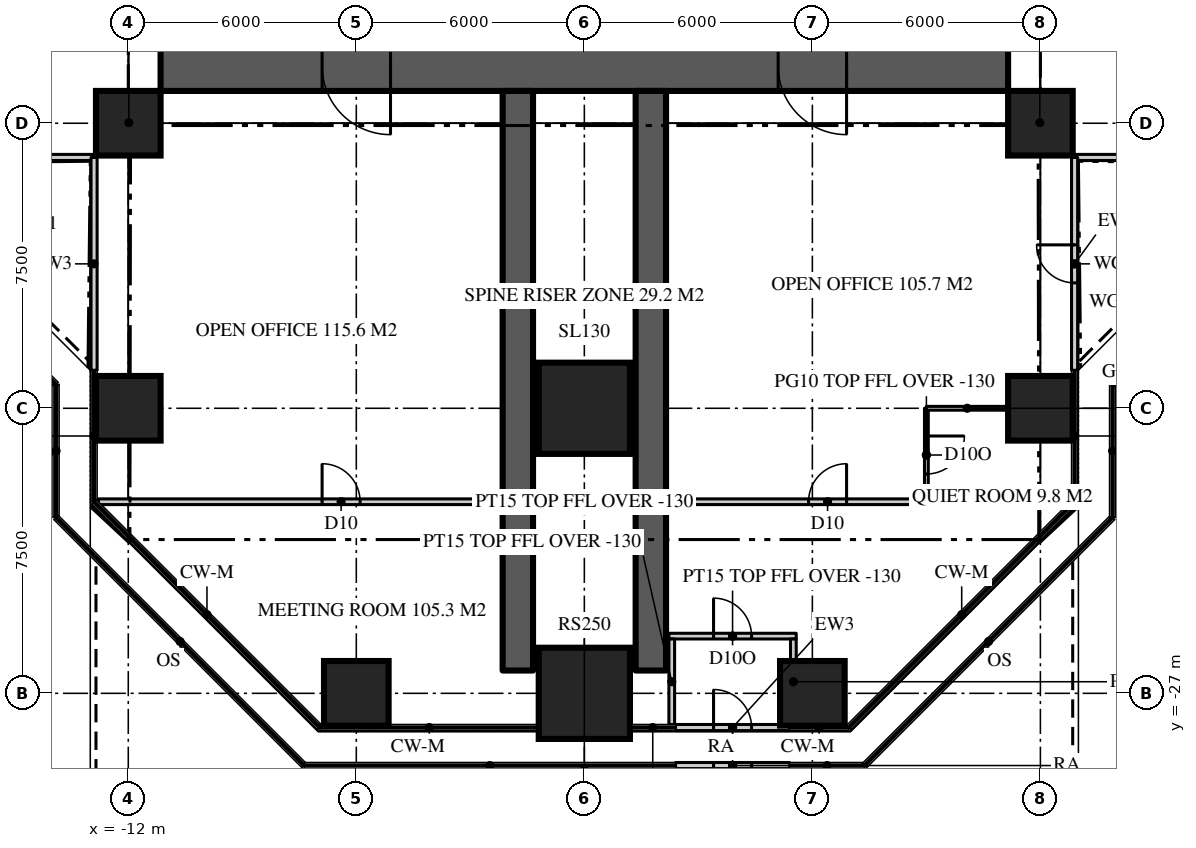
"""IFC4 building model, lengths in metres.
Left out: names, types, materials, properties, quantities, classifications, styles, units other than length and angle.
Written with IfcOpenShell. Run it as: python <this file> out.ifc"""

import sys

from ifc_helpers import new_model, si_unit, direction, frame, frame_2d, origin, origin_2d, place, context, subcontext, project, spatial, rectangle, extrude, element, fill, save


model = new_model("IFC4")
c1 = context("Model", 3, precision=1e-05, world=origin(), true_north=direction((0.0, 1.0)))
c2 = subcontext(c1, "Body", "Model", "MODEL_VIEW")
j1 = project(units=[si_unit("LENGTHUNIT", "METRE"), si_unit("PLANEANGLEUNIT", "RADIAN")], contexts=[c1])
p1 = place(None, origin())
s1 = spatial("IfcSite", under=j1, at=p1, CompositionType="ELEMENT")
p2 = place(p1, origin())
s2 = spatial("IfcBuilding", under=s1, at=p2, CompositionType="ELEMENT")
p3 = place(p2, frame((0.0, 0.0, 124.2)))
s3 = spatial("IfcBuildingStorey", under=s2, at=p3, CompositionType="ELEMENT", Elevation=124.2)
p4 = place(p3, frame((11.15, -10.5, 0.0), z_axis=(0.0, 0.0, 1.0), x_axis=(-1.0, 0.0, 0.0)))
e1 = element("IfcWall", 1, at=p4, inside=s3, PredefinedType="SHEAR", context=c2, shape_type="SweptSolid", body=[
    extrude(rectangle(XDim=22.3, YDim=1.3, at=frame_2d((11.15, 0.0))), origin(), (0.0, 0.0, 1.0), 3.9),
])
p5 = place(p4, frame((16.25, 0.0, 0.0)))
e2 = element("IfcOpeningElement", 2, at=p5, cuts=e1, PredefinedType="OPENING", context=c2, shape_type="SweptSolid", body=[
    extrude(rectangle(XDim=1.8, YDim=2.2, at=frame_2d((0.9, 1.1))), frame((0.0, 0.66, 0.0), z_axis=(0.0, -1.0, 0.0), x_axis=(1.0, 0.0, 0.0)), (0.0, 0.0, 1.0), 1.32),
])
p6 = place(p4, frame((4.25, 0.0, 0.0)))
e3 = element("IfcOpeningElement", 3, at=p6, cuts=e1, PredefinedType="OPENING", context=c2, shape_type="SweptSolid", body=[
    extrude(rectangle(XDim=1.8, YDim=2.2, at=frame_2d((0.9, 1.1))), frame((0.0, 0.66, 0.0), z_axis=(0.0, -1.0, 0.0), x_axis=(1.0, 0.0, 0.0)), (0.0, 0.0, 1.0), 1.32),
])
for number, where, z_axis, x_axis in (
    (4, (-1.75, -11.15, 0.0), (0.0, 0.0, 1.0), (0.0, -1.0, 0.0)),
    (5, (1.75, -11.15, 0.0), (0.0, 0.0, 1.0), (0.0, -1.0, 0.0)),
):
    element("IfcWall", number, at=place(p3, frame(where, z_axis=z_axis, x_axis=x_axis)), inside=s3, PredefinedType="SHEAR", context=c2, shape_type="SweptSolid", body=[
        extrude(rectangle(XDim=15.25, YDim=0.8, at=frame_2d((7.625, 0.0))), origin(), (0.0, 0.0, 1.0), 3.9),
    ])
p7 = place(p3, frame((-6.0, -27.0, -0.13), z_axis=(0.0, 0.0, 1.0), x_axis=(1.0, 0.0, 0.0)))
e6 = element("IfcColumn", 6, at=p7, inside=s3, PredefinedType="COLUMN", context=c2, shape_type="SweptSolid", body=[
    extrude(rectangle(XDim=1.7, YDim=1.7, at=origin_2d()), origin(), (0.0, 0.0, 1.0), 4.03),
])
p8 = place(p3, frame((0.0, -27.0, 0.0), z_axis=(0.0, 0.0, 1.0), x_axis=(1.0, 0.0, 0.0)))
e7 = element("IfcColumn", 7, at=p8, inside=s3, PredefinedType="COLUMN", context=c2, shape_type="SweptSolid", body=[
    extrude(rectangle(XDim=2.4, YDim=2.4, at=origin_2d()), origin(), (0.0, 0.0, 1.0), 3.9),
])
p9 = place(p3, frame((6.0, -27.0, -0.13), z_axis=(0.0, 0.0, 1.0), x_axis=(1.0, 0.0, 0.0)))
e8 = element("IfcColumn", 8, at=p9, inside=s3, PredefinedType="COLUMN", context=c2, shape_type="SweptSolid", body=[
    extrude(rectangle(XDim=1.7, YDim=1.7, at=origin_2d()), origin(), (0.0, 0.0, 1.0), 4.03),
])
p10 = place(p3, frame((-12.0, -19.5, 0.0), z_axis=(0.0, 0.0, 1.0), x_axis=(1.0, 0.0, 0.0)))
e9 = element("IfcColumn", 9, at=p10, inside=s3, PredefinedType="COLUMN", context=c2, shape_type="SweptSolid", body=[
    extrude(rectangle(XDim=1.7, YDim=1.7, at=origin_2d()), origin(), (0.0, 0.0, 1.0), 3.9),
])
p11 = place(p3, frame((0.0, -19.5, 0.0), z_axis=(0.0, 0.0, 1.0), x_axis=(1.0, 0.0, 0.0)))
e10 = element("IfcColumn", 10, at=p11, inside=s3, PredefinedType="COLUMN", context=c2, shape_type="SweptSolid", body=[
    extrude(rectangle(XDim=2.4, YDim=2.4, at=origin_2d()), origin(), (0.0, 0.0, 1.0), 3.9),
])
for number, where, z_axis, x_axis in (
    (11, (12.0, -19.5, 0.0), (0.0, 0.0, 1.0), (1.0, 0.0, 0.0)),
    (12, (-12.0, -12.0, 0.0), (0.0, 0.0, 1.0), (1.0, 0.0, 0.0)),
    (13, (12.0, -12.0, 0.0), (0.0, 0.0, 1.0), (1.0, 0.0, 0.0)),
):
    element("IfcColumn", number, at=place(p3, frame(where, z_axis=z_axis, x_axis=x_axis)), inside=s3, PredefinedType="COLUMN", context=c2, shape_type="SweptSolid", body=[
        extrude(rectangle(XDim=1.7, YDim=1.7, at=origin_2d()), origin(), (0.0, 0.0, 1.0), 3.9),
    ])
p12 = place(p3, frame((12.9, -12.9, 0.0), z_axis=(0.0, 0.0, 1.0), x_axis=(1.0, 0.0, 0.0)))
e14 = element("IfcWall", 14, at=p12, inside=s3, PredefinedType="SOLIDWALL", context=c2, shape_type="SweptSolid", body=[
    extrude(rectangle(XDim=5.6, YDim=0.16, at=frame_2d((2.8, 0.0))), origin(), (0.0, 0.0, 1.0), 3.77),
])
p13 = place(p3, frame((-18.5, -12.9, 0.0), z_axis=(0.0, 0.0, 1.0), x_axis=(1.0, 0.0, 0.0)))
e15 = element("IfcWall", 15, at=p13, inside=s3, PredefinedType="SOLIDWALL", context=c2, shape_type="SweptSolid", body=[
    extrude(rectangle(XDim=5.6, YDim=0.16, at=frame_2d((2.8, 0.0))), origin(), (0.0, 0.0, 1.0), 3.77),
])
p14 = place(p13, frame((2.3, 0.0, 0.0)))
e16 = element("IfcOpeningElement", 16, at=p14, cuts=e15, PredefinedType="OPENING", context=c2, shape_type="SweptSolid", body=[
    extrude(rectangle(XDim=1.0, YDim=2.2, at=frame_2d((0.5, 1.1))), frame((0.0, 0.09, 0.0), z_axis=(0.0, -1.0, 0.0), x_axis=(1.0, 0.0, 0.0)), (0.0, 0.0, 1.0), 0.18),
])
p15 = place(p3, frame((-12.9, -12.9, 0.0), z_axis=(0.0, 0.0, 1.0), x_axis=(0.0, -1.0, 0.0)))
e17 = element("IfcWall", 17, at=p15, inside=s3, PredefinedType="SOLIDWALL", context=c2, shape_type="SweptSolid", body=[
    extrude(rectangle(XDim=5.6, YDim=0.16, at=frame_2d((2.8, 0.0))), origin(), (0.0, 0.0, 1.0), 3.77),
])
p16 = place(p3, frame((2.4, -27.9, 0.0), z_axis=(0.0, 0.0, 1.0), x_axis=(1.0, 0.0, 0.0)))
e18 = element("IfcWall", 18, at=p16, inside=s3, PredefinedType="SOLIDWALL", context=c2, shape_type="SweptSolid", body=[
    extrude(rectangle(XDim=3.0, YDim=0.16, at=frame_2d((1.5, 0.0))), origin(), (0.0, 0.0, 1.0), 3.77),
])
p17 = place(p16, frame((1.0, 0.0, 0.0)))
e19 = element("IfcOpeningElement", 19, at=p17, cuts=e18, PredefinedType="OPENING", context=c2, shape_type="SweptSolid", body=[
    extrude(rectangle(XDim=1.0, YDim=2.2, at=frame_2d((0.5, 1.1))), frame((0.0, 0.09, 0.0), z_axis=(0.0, -1.0, 0.0), x_axis=(1.0, 0.0, 0.0)), (0.0, 0.0, 1.0), 0.18),
])
p18 = place(p3, frame((12.9, -18.5, 0.0), z_axis=(0.0, 0.0, 1.0), x_axis=(0.0, 1.0, 0.0)))
e20 = element("IfcWall", 20, at=p18, inside=s3, PredefinedType="SOLIDWALL", context=c2, shape_type="SweptSolid", body=[
    extrude(rectangle(XDim=5.6, YDim=0.16, at=frame_2d((2.8, 0.0))), origin(), (0.0, 0.0, 1.0), 3.77),
])
p19 = place(p18, frame((2.3, 0.0, 0.0)))
e21 = element("IfcOpeningElement", 21, at=p19, cuts=e20, PredefinedType="OPENING", context=c2, shape_type="SweptSolid", body=[
    extrude(rectangle(XDim=1.0, YDim=2.2, at=frame_2d((0.5, 1.1))), frame((0.0, 0.09, 0.0), z_axis=(0.0, -1.0, 0.0), x_axis=(1.0, 0.0, 0.0)), (0.0, 0.0, 1.0), 0.18),
])
p20 = place(p3, frame((5.4, -28.9, 0.0), z_axis=(0.0, 0.0, 1.0), x_axis=(-1.0, 0.0, 0.0)))
e22 = element("IfcWall", 22, at=p20, inside=s3, PredefinedType="SOLIDWALL", context=c2, shape_type="SweptSolid", body=[
    extrude(rectangle(XDim=3.0, YDim=0.16, at=frame_2d((1.5, 0.0))), origin(), (0.0, 0.0, 1.0), 3.9),
])
p21 = place(p20, frame((1.0, 0.0, 0.0)))
e23 = element("IfcOpeningElement", 23, at=p21, cuts=e22, PredefinedType="OPENING", context=c2, shape_type="SweptSolid", body=[
    extrude(rectangle(XDim=1.0, YDim=2.2, at=frame_2d((0.5, 1.1))), frame((0.0, 0.09, 0.0), z_axis=(0.0, -1.0, 0.0), x_axis=(1.0, 0.0, 0.0)), (0.0, 0.0, 1.0), 0.18),
])
p22 = place(p3, frame((-12.786, -21.959, 0.0), z_axis=(0.0, 0.0, 1.0), x_axis=(1.0, 0.0, 0.0)))
e24 = element("IfcWall", 24, at=p22, inside=s3, PredefinedType="PARTITIONING", context=c2, shape_type="SweptSolid", body=[
    extrude(rectangle(XDim=25.573, YDim=0.15, at=frame_2d((12.786, 0.0))), origin(), (0.0, 0.0, 1.0), 3.77),
])
p23 = place(p22, frame((18.687, 0.0, 0.0)))
e25 = element("IfcOpeningElement", 25, at=p23, cuts=e24, PredefinedType="OPENING", context=c2, shape_type="SweptSolid", body=[
    extrude(rectangle(XDim=1.0, YDim=2.2, at=frame_2d((0.5, 1.1))), frame((0.0, 0.085, 0.0), z_axis=(0.0, -1.0, 0.0), x_axis=(1.0, 0.0, 0.0)), (0.0, 0.0, 1.0), 0.17),
])
p24 = place(p22, frame((5.886, 0.0, 0.0)))
e26 = element("IfcOpeningElement", 26, at=p24, cuts=e24, PredefinedType="OPENING", context=c2, shape_type="SweptSolid", body=[
    extrude(rectangle(XDim=1.0, YDim=2.2, at=frame_2d((0.5, 1.1))), frame((0.0, 0.085, 0.0), z_axis=(0.0, -1.0, 0.0), x_axis=(1.0, 0.0, 0.0)), (0.0, 0.0, 1.0), 0.17),
])
p25 = place(p3, frame((9.0, -19.5, 0.0), z_axis=(0.0, 0.0, 1.0), x_axis=(0.0, -1.0, 0.0)))
e27 = element("IfcWall", 27, at=p25, inside=s3, PredefinedType="PARTITIONING", context=c2, shape_type="SweptSolid", body=[
    extrude(rectangle(XDim=2.459, YDim=0.1, at=frame_2d((1.229, 0.0))), origin(), (0.0, 0.0, 1.0), 3.77),
])
p26 = place(p25, frame((0.729, 0.0, 0.0)))
e28 = element("IfcOpeningElement", 28, at=p26, cuts=e27, PredefinedType="OPENING", context=c2, shape_type="SweptSolid", body=[
    extrude(rectangle(XDim=1.0, YDim=2.2, at=frame_2d((0.5, 1.1))), frame((0.0, 0.06, 0.0), z_axis=(0.0, -1.0, 0.0), x_axis=(1.0, 0.0, 0.0)), (0.0, 0.0, 1.0), 0.12),
])
p27 = place(p3, frame((9.0, -19.5, 0.0), z_axis=(0.0, 0.0, 1.0), x_axis=(1.0, 0.0, 0.0)))
e29 = element("IfcWall", 29, at=p27, inside=s3, PredefinedType="PARTITIONING", context=c2, shape_type="SweptSolid", body=[
    extrude(rectangle(XDim=2.15, YDim=0.1, at=frame_2d((1.075, 0.0))), origin(), (0.0, 0.0, 1.0), 2.77),
])
p28 = place(p3, frame((2.225, -25.495, 0.0), z_axis=(0.0, 0.0, 1.0), x_axis=(1.0, 0.0, 0.0)))
e30 = element("IfcWall", 30, at=p28, inside=s3, PredefinedType="PARTITIONING", context=c2, shape_type="SweptSolid", body=[
    extrude(rectangle(XDim=3.35, YDim=0.15, at=frame_2d((1.675, 0.0))), origin(), (0.0, 0.0, 1.0), 3.77),
])
p29 = place(p28, frame((1.175, 0.0, 0.0)))
e31 = element("IfcOpeningElement", 31, at=p29, cuts=e30, PredefinedType="OPENING", context=c2, shape_type="SweptSolid", body=[
    extrude(rectangle(XDim=1.0, YDim=2.2, at=frame_2d((0.5, 1.1))), frame((0.0, 0.085, 0.0), z_axis=(0.0, -1.0, 0.0), x_axis=(1.0, 0.0, 0.0)), (0.0, 0.0, 1.0), 0.17),
])
for number, where, z_axis, x_axis in (
    (32, (2.3, -25.57, 0.0), (0.0, 0.0, 1.0), (0.0, -1.0, 0.0)),
    (33, (5.5, -25.57, 0.0), (0.0, 0.0, 1.0), (0.0, -1.0, 0.0)),
):
    element("IfcWall", number, at=place(p3, frame(where, z_axis=z_axis, x_axis=x_axis)), inside=s3, PredefinedType="PARTITIONING", context=c2, shape_type="SweptSolid", body=[
        extrude(rectangle(XDim=2.25, YDim=0.15, at=frame_2d((1.125, 0.0))), origin(), (0.0, 0.0, 1.0), 3.77),
    ])
for number, where, z_axis, x_axis in (
    (34, (-11.15, -11.15, 0.0), (0.0, 0.0, 1.0), (-0.707, -0.707, 0.0)),
    (35, (11.15, -11.15, 0.0), (0.0, 0.0, 1.0), (0.707, -0.707, 0.0)),
):
    element("IfcWall", number, at=place(p3, frame(where, z_axis=z_axis, x_axis=x_axis)), inside=s3, PredefinedType="PARTITIONING", context=c2, shape_type="SweptSolid", body=[
        extrude(rectangle(XDim=2.362, YDim=0.15, at=frame_2d((1.181, 0.0))), origin(), (0.0, 0.0, 1.0), 3.22),
    ])
p30 = place(p17, origin())
e36 = element("IfcDoor", 36, at=p30, inside=s3, OperationType="SINGLE_SWING_LEFT", PredefinedType="DOOR", context=c2, shape_type="SweptSolid", body=[
    extrude(rectangle(XDim=1.0, YDim=2.2, at=frame_2d((0.5, 1.1))), frame((0.0, 0.025, 0.0), z_axis=(0.0, -1.0, 0.0), x_axis=(1.0, 0.0, 0.0)), (0.0, 0.0, 1.0), 0.05),
])
fill(e19, e36)
p31 = place(p19, origin())
e37 = element("IfcDoor", 37, at=p31, inside=s3, OperationType="SINGLE_SWING_RIGHT", PredefinedType="DOOR", context=c2, shape_type="SweptSolid", body=[
    extrude(rectangle(XDim=1.0, YDim=2.2, at=frame_2d((0.5, 1.1))), frame((0.0, 0.025, 0.0), z_axis=(0.0, -1.0, 0.0), x_axis=(1.0, 0.0, 0.0)), (0.0, 0.0, 1.0), 0.05),
])
fill(e21, e37)
p32 = place(p21, origin())
e38 = element("IfcDoor", 38, at=p32, inside=s3, OperationType="SINGLE_SWING_RIGHT", PredefinedType="DOOR", context=c2, shape_type="SweptSolid", body=[
    extrude(rectangle(XDim=1.0, YDim=2.2, at=frame_2d((0.5, 1.1))), frame((0.0, 0.025, 0.0), z_axis=(0.0, -1.0, 0.0), x_axis=(1.0, 0.0, 0.0)), (0.0, 0.0, 1.0), 0.05),
])
fill(e23, e38)
p33 = place(p5, origin())
e39 = element("IfcDoor", 39, at=p33, inside=s3, OperationType="DOUBLE_DOOR_DOUBLE_SWING", PredefinedType="DOOR", context=c2, shape_type="SweptSolid", body=[
    extrude(rectangle(XDim=1.8, YDim=2.2, at=frame_2d((0.9, 1.1))), frame((0.0, 0.025, 0.0), z_axis=(0.0, -1.0, 0.0), x_axis=(1.0, 0.0, 0.0)), (0.0, 0.0, 1.0), 0.05),
])
fill(e2, e39)
p34 = place(p6, origin())
e40 = element("IfcDoor", 40, at=p34, inside=s3, OperationType="DOUBLE_DOOR_DOUBLE_SWING", PredefinedType="DOOR", context=c2, shape_type="SweptSolid", body=[
    extrude(rectangle(XDim=1.8, YDim=2.2, at=frame_2d((0.9, 1.1))), frame((0.0, 0.025, 0.0), z_axis=(0.0, -1.0, 0.0), x_axis=(1.0, 0.0, 0.0)), (0.0, 0.0, 1.0), 0.05),
])
fill(e3, e40)
p35 = place(p23, origin())
e41 = element("IfcDoor", 41, at=p35, inside=s3, OperationType="SINGLE_SWING_RIGHT", PredefinedType="DOOR", context=c2, shape_type="SweptSolid", body=[
    extrude(rectangle(XDim=1.0, YDim=2.2, at=frame_2d((0.5, 1.1))), frame((0.0, 0.025, 0.0), z_axis=(0.0, -1.0, 0.0), x_axis=(1.0, 0.0, 0.0)), (0.0, 0.0, 1.0), 0.05),
])
fill(e25, e41)
p36 = place(p24, origin())
e42 = element("IfcDoor", 42, at=p36, inside=s3, OperationType="SINGLE_SWING_LEFT", PredefinedType="DOOR", context=c2, shape_type="SweptSolid", body=[
    extrude(rectangle(XDim=1.0, YDim=2.2, at=frame_2d((0.5, 1.1))), frame((0.0, 0.025, 0.0), z_axis=(0.0, -1.0, 0.0), x_axis=(1.0, 0.0, 0.0)), (0.0, 0.0, 1.0), 0.05),
])
fill(e26, e42)
p37 = place(p26, origin())
e43 = element("IfcDoor", 43, at=p37, inside=s3, OperationType="SINGLE_SWING_LEFT", PredefinedType="DOOR", context=c2, shape_type="SweptSolid", body=[
    extrude(rectangle(XDim=1.0, YDim=2.2, at=frame_2d((0.5, 1.1))), frame((0.0, 0.025, 0.0), z_axis=(0.0, -1.0, 0.0), x_axis=(1.0, 0.0, 0.0)), (0.0, 0.0, 1.0), 0.05),
])
fill(e28, e43)
p38 = place(p29, origin())
e44 = element("IfcDoor", 44, at=p38, inside=s3, OperationType="SINGLE_SWING_LEFT", PredefinedType="DOOR", context=c2, shape_type="SweptSolid", body=[
    extrude(rectangle(XDim=1.0, YDim=2.2, at=frame_2d((0.5, 1.1))), frame((0.0, 0.025, 0.0), z_axis=(0.0, -1.0, 0.0), x_axis=(1.0, 0.0, 0.0)), (0.0, 0.0, 1.0), 0.05),
])
fill(e31, e44)
save(model, sys.argv[1])
